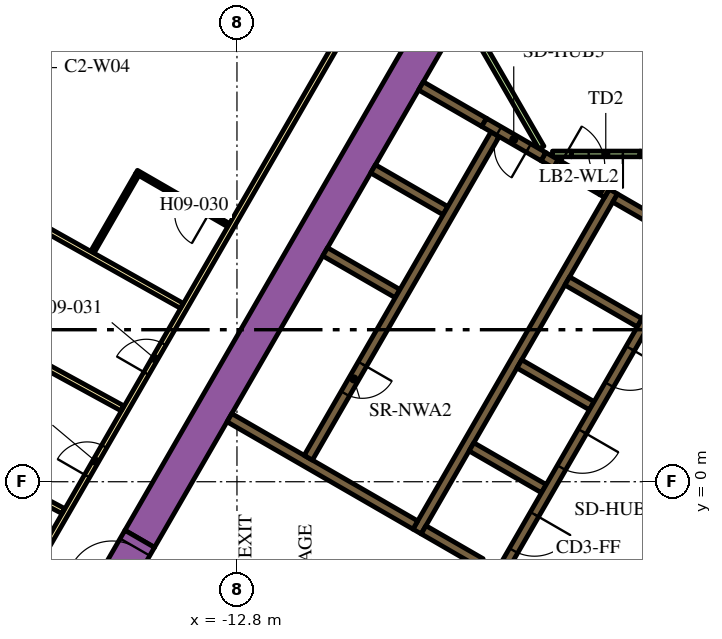
"""IFC4 building model, lengths in metres.
Left out: names, types, materials, properties, quantities, classifications, styles, units other than length and angle.
Written with IfcOpenShell. Run it as: python <this file> out.ifc"""

import sys

from ifc_helpers import new_model, si_unit, direction, frame, frame_2d, origin, place, context, subcontext, project, spatial, polyline, rectangle, outline, extrude, element, fill, save


model = new_model("IFC4")
c1 = context("Model", 3, precision=1e-05, world=origin(), true_north=direction((0.0, 1.0)))
c2 = subcontext(c1, "Body", "Model", "MODEL_VIEW")
j1 = project(units=[si_unit("LENGTHUNIT", "METRE"), si_unit("PLANEANGLEUNIT", "RADIAN")], contexts=[c1])
p1 = place(None, origin())
s1 = spatial("IfcSite", under=j1, at=p1, CompositionType="ELEMENT")
p2 = place(p1, origin())
s2 = spatial("IfcBuilding", under=s1, at=p2, CompositionType="ELEMENT")
p3 = place(p2, frame((0.0, 0.0, 118.8)))
s3 = spatial("IfcBuildingStorey", under=s2, at=p3, CompositionType="ELEMENT", Elevation=118.8)
p4 = place(p3, frame((-15.36, -1.503, 0.0), z_axis=(0.0, 0.0, 1.0), x_axis=(0.50000389221, 0.866023156604, 0.0)))
e1 = element("IfcWall", 1, at=p4, inside=s3, PredefinedType="SOLIDWALL", context=c2, shape_type="SweptSolid", body=[
    extrude(rectangle(XDim=21.0, YDim=0.9, at=frame_2d((10.5, 0.0))), origin(), (0.0, 0.0, 1.0), 3.9),
])
p5 = place(p3, frame((-8.06, -1.311, 0.0), z_axis=(0.0, 0.0, 1.0), x_axis=(0.50000273126, 0.866023826885, 0.0)))
e2 = element("IfcWall", 2, at=p5, inside=s3, PredefinedType="SOLIDWALL", context=c2, shape_type="SweptSolid", body=[
    extrude(rectangle(XDim=10.33, YDim=0.25, at=frame_2d((5.165, 0.0))), origin(), (0.0, 0.0, 1.0), 3.9),
])
p6 = place(p3, frame((-1.647, 6.771, 0.0), z_axis=(0.0, 0.0, 1.0), x_axis=(-0.865971728693, 0.500092956464, 0.0)))
e3 = element("IfcWall", 3, at=p6, inside=s3, PredefinedType="SOLIDWALL", context=c2, shape_type="SweptSolid", body=[
    extrude(rectangle(XDim=1.388, YDim=0.25, at=frame_2d((0.694, 0.0))), origin(), (0.0, 0.0, 1.0), 3.9),
])
for number, where, z_axis, x_axis in (
    (4, (-2.204, 4.182, 0.0), (0.0, 0.0, 1.0), (-0.866, 0.5, 0.0)),
    (5, (-5.369, 3.1, 0.0), (0.0, 0.0, 1.0), (0.866, -0.5, 0.0)),
    (6, (-4.724, -0.182, 0.0), (0.0, 0.0, 1.0), (-0.866, 0.5, 0.0)),
):
    element("IfcWall", number, at=place(p3, frame(where, z_axis=z_axis, x_axis=x_axis)), inside=s3, PredefinedType="SOLIDWALL", context=c2, shape_type="SweptSolid", body=[
        extrude(rectangle(XDim=2.2, YDim=0.25, at=frame_2d((1.1, 0.0))), origin(), (0.0, 0.0, 1.0), 3.9),
    ])
p7 = place(p3, frame((-7.889, -1.265, 0.0), z_axis=(0.0, 0.0, 1.0), x_axis=(0.865986741702, -0.500066958712, 0.0)))
e7 = element("IfcWall", 7, at=p7, inside=s3, PredefinedType="SOLIDWALL", context=c2, shape_type="SweptSolid", body=[
    extrude(rectangle(XDim=1.738, YDim=0.25, at=frame_2d((0.869, 0.0))), origin(), (0.0, 0.0, 1.0), 3.9),
])
p8 = place(p3, frame((-8.106, -1.14, 0.0), z_axis=(0.0, 0.0, 1.0), x_axis=(-0.866000643155, 0.500042884217, 0.0)))
e8 = element("IfcWall", 8, at=p8, inside=s3, PredefinedType="SOLIDWALL", context=c2, shape_type="SweptSolid", body=[
    extrude(rectangle(XDim=5.65, YDim=0.25, at=frame_2d((2.825, 0.0))), origin(), (0.0, 0.0, 1.0), 3.9),
])
p9 = place(p3, origin())
e9 = element("IfcWall", 9, at=p9, inside=s3, PredefinedType="SOLIDWALL", context=c2, shape_type="SweptSolid", body=[
    extrude(outline(polyline([(-3.128, 7.481), (-3.259, 7.557), (-3.134, 7.773), (-3.003, 7.698), (-3.128, 7.481)])), origin(), (0.0, 0.0, 1.0), 3.9),
])
for number, where, z_axis, x_axis in (
    (10, (-8.574, 4.95, 0.0), (0.0, 0.0, 1.0), (-0.866, 0.5, 0.0)),
    (11, (-7.314, 7.132, 0.0), (0.0, 0.0, 1.0), (-0.866, 0.5, 0.0)),
):
    element("IfcWall", number, at=place(p3, frame(where, z_axis=z_axis, x_axis=x_axis)), inside=s3, PredefinedType="SOLIDWALL", context=c2, shape_type="SweptSolid", body=[
        extrude(rectangle(XDim=2.2, YDim=0.25, at=frame_2d((1.1, 0.0))), origin(), (0.0, 0.0, 1.0), 3.9),
    ])
p10 = place(p3, frame((-6.296, 9.455, 0.0), z_axis=(0.0, 0.0, 1.0), x_axis=(-0.866011930837, 0.500023335103, 0.0)))
e12 = element("IfcWall", 12, at=p10, inside=s3, PredefinedType="SOLIDWALL", context=c2, shape_type="SweptSolid", body=[
    extrude(rectangle(XDim=1.92, YDim=0.25, at=frame_2d((0.96, 0.0))), origin(), (0.0, 0.0, 1.0), 3.9),
])
p11 = place(p3, frame((-4.409, 8.365, 0.0), z_axis=(0.0, 0.0, 1.0), x_axis=(-0.866057014183, 0.499945245186, 0.0)))
e13 = element("IfcWall", 13, at=p11, inside=s3, PredefinedType="SOLIDWALL", context=c2, shape_type="SweptSolid", body=[
    extrude(rectangle(XDim=0.379, YDim=0.25, at=frame_2d((0.19, 0.0))), origin(), (0.0, 0.0, 1.0), 3.9),
])
p12 = place(p3, frame((-2.195, 8.625, 0.0), z_axis=(0.0, 0.0, 1.0), x_axis=(1.0, 0.0, 0.0)))
e14 = element("IfcWall", 14, at=p12, inside=s3, PredefinedType="PARTITIONING", context=c2, shape_type="SweptSolid", body=[
    extrude(rectangle(XDim=1.145, YDim=0.15, at=frame_2d((0.573, 0.0))), origin(), (0.0, 0.0, 1.0), 2.75),
])
p13 = place(p3, frame((-6.823, 12.318, 0.0), z_axis=(0.0, 0.0, 1.0), x_axis=(0.500007885066, -0.866020851292, 0.0)))
e15 = element("IfcWall", 15, at=p13, inside=s3, PredefinedType="PARTITIONING", context=c2, shape_type="SweptSolid", body=[
    extrude(rectangle(XDim=4.072, YDim=0.15, at=frame_2d((2.036, 0.0))), origin(), (0.0, 0.0, 1.0), 2.75),
])
p14 = place(p3, frame((-4.498, 8.625, 0.0), z_axis=(0.0, 0.0, 1.0), x_axis=(1.0, 0.0, 0.0)))
e16 = element("IfcWall", 16, at=p14, inside=s3, PredefinedType="PARTITIONING", context=c2, shape_type="SweptSolid", body=[
    extrude(rectangle(XDim=0.502, YDim=0.15, at=frame_2d((0.251, 0.0))), origin(), (0.0, 0.0, 1.0), 2.75),
])
p15 = place(p3, frame((-6.008, 9.144, 0.0), z_axis=(0.0, 0.0, 1.0), x_axis=(-0.500006956611, -0.866021387346, 0.0)))
e17 = element("IfcWall", 17, at=p15, inside=s3, PredefinedType="SOLIDWALL", context=c2, shape_type="SweptSolid", body=[
    extrude(rectangle(XDim=9.83, YDim=0.25, at=frame_2d((4.915, 0.0))), origin(), (0.0, 0.0, 1.0), 3.9),
])
p16 = place(p15, frame((6.985, 0.0, 0.0)))
e18 = element("IfcOpeningElement", 18, at=p16, cuts=e17, PredefinedType="OPENING", context=c2, shape_type="SweptSolid", body=[
    extrude(rectangle(XDim=0.9, YDim=2.1, at=frame_2d((0.45, 1.05))), frame((0.0, 0.135, 0.0), z_axis=(0.0, -1.0, 0.0), x_axis=(1.0, 0.0, 0.0)), (0.0, 0.0, 1.0), 0.27),
])
p17 = place(p3, frame((-0.898, 6.194, 0.0), z_axis=(0.0, 0.0, 1.0), x_axis=(-0.499996202215, -0.866027596426, 0.0)))
e19 = element("IfcWall", 19, at=p17, inside=s3, PredefinedType="SOLIDWALL", context=c2, shape_type="SweptSolid", body=[
    extrude(rectangle(XDim=9.83, YDim=0.25, at=frame_2d((4.915, 0.0))), origin(), (0.0, 0.0, 1.0), 3.9),
])
p18 = place(p17, frame((0.585, 0.0, 0.0)))
e20 = element("IfcOpeningElement", 20, at=p18, cuts=e19, PredefinedType="OPENING", context=c2, shape_type="SweptSolid", body=[
    extrude(rectangle(XDim=1.1, YDim=2.1, at=frame_2d((0.55, 1.05))), frame((0.0, 0.135, 0.0), z_axis=(0.0, -1.0, 0.0), x_axis=(1.0, 0.0, 0.0)), (0.0, 0.0, 1.0), 0.27),
])
p19 = place(p17, frame((3.105, 0.0, 0.0)))
e21 = element("IfcOpeningElement", 21, at=p19, cuts=e19, PredefinedType="OPENING", context=c2, shape_type="SweptSolid", body=[
    extrude(rectangle(XDim=1.1, YDim=2.1, at=frame_2d((0.55, 1.05))), frame((0.0, 0.135, 0.0), z_axis=(0.0, -1.0, 0.0), x_axis=(1.0, 0.0, 0.0)), (0.0, 0.0, 1.0), 0.27),
])
p20 = place(p17, frame((5.625, 0.0, 0.0)))
e22 = element("IfcOpeningElement", 22, at=p20, cuts=e19, PredefinedType="OPENING", context=c2, shape_type="SweptSolid", body=[
    extrude(rectangle(XDim=1.1, YDim=2.1, at=frame_2d((0.55, 1.05))), frame((0.0, 0.135, 0.0), z_axis=(0.0, -1.0, 0.0), x_axis=(1.0, 0.0, 0.0)), (0.0, 0.0, 1.0), 0.27),
])
p21 = place(p17, frame((8.145, 0.0, 0.0)))
e23 = element("IfcOpeningElement", 23, at=p21, cuts=e19, PredefinedType="OPENING", context=c2, shape_type="SweptSolid", body=[
    extrude(rectangle(XDim=1.1, YDim=2.1, at=frame_2d((0.55, 1.05))), frame((0.0, 0.135, 0.0), z_axis=(0.0, -1.0, 0.0), x_axis=(1.0, 0.0, 0.0)), (0.0, 0.0, 1.0), 0.27),
])
p22 = place(p3, frame((-2.195, 8.625, 0.0), z_axis=(0.0, 0.0, 1.0), x_axis=(-1.0, 0.0, 0.0)))
e24 = element("IfcWall", 24, at=p22, inside=s3, PredefinedType="PARTITIONING", context=c2, shape_type="SweptSolid", body=[
    extrude(rectangle(XDim=1.8, YDim=0.15, at=frame_2d((0.9, 0.0))), origin(), (0.0, 0.0, 1.0), 2.75),
])
p23 = place(p22, frame((0.45, 0.0, 0.0)))
e25 = element("IfcOpeningElement", 25, at=p23, cuts=e24, PredefinedType="OPENING", context=c2, shape_type="SweptSolid", body=[
    extrude(rectangle(XDim=0.9, YDim=2.1, at=frame_2d((0.45, 1.05))), frame((0.0, 0.085, 0.0), z_axis=(0.0, -1.0, 0.0), x_axis=(1.0, 0.0, 0.0)), (0.0, 0.0, 1.0), 0.17),
])
p24 = place(p3, frame((-4.409, 8.365, 0.0), z_axis=(0.0, 0.0, 1.0), x_axis=(0.866034573852, -0.49998411664, 0.0)))
e26 = element("IfcWall", 26, at=p24, inside=s3, PredefinedType="SOLIDWALL", context=c2, shape_type="SweptSolid", body=[
    extrude(rectangle(XDim=1.4, YDim=0.25, at=frame_2d((0.7, 0.0))), origin(), (0.0, 0.0, 1.0), 3.9),
])
p25 = place(p24, frame((0.1, 0.0, 0.0)))
e27 = element("IfcOpeningElement", 27, at=p25, cuts=e26, PredefinedType="OPENING", context=c2, shape_type="SweptSolid", body=[
    extrude(rectangle(XDim=1.2, YDim=2.1, at=frame_2d((0.6, 1.05))), frame((0.0, 0.135, 0.0), z_axis=(0.0, -1.0, 0.0), x_axis=(1.0, 0.0, 0.0)), (0.0, 0.0, 1.0), 0.27),
])
p26 = place(p3, frame((-16.209, -2.976, 0.0), z_axis=(0.0, 0.0, 1.0), x_axis=(0.499954529098, 0.86605165483, 0.0)))
e28 = element("IfcWall", 28, at=p26, inside=s3, PredefinedType="SOLIDWALL", context=c2, shape_type="SweptSolid", body=[
    extrude(rectangle(XDim=1.7, YDim=0.9, at=frame_2d((0.85, 0.0))), origin(), (0.0, 0.0, 1.0), 3.9),
])
p27 = place(p26, frame((0.25, 0.0, 0.0)))
e29 = element("IfcOpeningElement", 29, at=p27, cuts=e28, PredefinedType="OPENING", context=c2, shape_type="SweptSolid", body=[
    extrude(rectangle(XDim=1.2, YDim=2.1, at=frame_2d((0.6, 1.05))), frame((0.0, 0.46, 0.0), z_axis=(0.0, -1.0, 0.0), x_axis=(1.0, 0.0, 0.0)), (0.0, 0.0, 1.0), 0.92),
])
p28 = place(p3, frame((-4.737, 8.555, 0.0), z_axis=(0.0, 0.0, 1.0), x_axis=(-0.865989075817, 0.500062916607, 0.0)))
e30 = element("IfcWall", 30, at=p28, inside=s3, PredefinedType="SOLIDWALL", context=c2, shape_type="SweptSolid", body=[
    extrude(rectangle(XDim=1.8, YDim=0.25, at=frame_2d((0.9, 0.0))), origin(), (0.0, 0.0, 1.0), 3.9),
])
p29 = place(p28, frame((0.45, 0.0, 0.0)))
e31 = element("IfcOpeningElement", 31, at=p29, cuts=e30, PredefinedType="OPENING", context=c2, shape_type="SweptSolid", body=[
    extrude(rectangle(XDim=0.9, YDim=2.1, at=frame_2d((0.45, 1.05))), frame((0.0, 0.135, 0.0), z_axis=(0.0, -1.0, 0.0), x_axis=(1.0, 0.0, 0.0)), (0.0, 0.0, 1.0), 0.27),
])
p30 = place(p3, frame((-19.081, -3.9, 0.0), z_axis=(0.0, 0.0, 1.0), x_axis=(0.499998313975, 0.866026377209, 0.0)))
e32 = element("IfcWall", 32, at=p30, inside=s3, PredefinedType="PARTITIONING", context=c2, shape_type="SweptSolid", body=[
    extrude(rectangle(XDim=25.766, YDim=0.15, at=frame_2d((12.883, 0.0))), origin(), (0.0, 0.0, 1.0), 2.75),
])
p31 = place(p30, frame((19.306, 0.0, 0.0)))
e33 = element("IfcOpeningElement", 33, at=p31, cuts=e32, PredefinedType="OPENING", context=c2, shape_type="SweptSolid", body=[
    extrude(rectangle(XDim=1.0, YDim=2.1, at=frame_2d((0.5, 1.05))), frame((0.0, 0.085, 0.0), z_axis=(0.0, -1.0, 0.0), x_axis=(1.0, 0.0, 0.0)), (0.0, 0.0, 1.0), 0.17),
])
p32 = place(p30, frame((18.0, 0.0, 0.0)))
e34 = element("IfcOpeningElement", 34, at=p32, cuts=e32, PredefinedType="OPENING", context=c2, shape_type="SweptSolid", body=[
    extrude(rectangle(XDim=1.0, YDim=2.1, at=frame_2d((0.5, 1.05))), frame((0.0, 0.085, 0.0), z_axis=(0.0, -1.0, 0.0), x_axis=(1.0, 0.0, 0.0)), (0.0, 0.0, 1.0), 0.17),
])
p33 = place(p30, frame((7.793, 0.0, 0.0)))
e35 = element("IfcOpeningElement", 35, at=p33, cuts=e32, PredefinedType="OPENING", context=c2, shape_type="SweptSolid", body=[
    extrude(rectangle(XDim=0.9, YDim=2.1, at=frame_2d((0.45, 1.05))), frame((0.0, 0.085, 0.0), z_axis=(0.0, -1.0, 0.0), x_axis=(1.0, 0.0, 0.0)), (0.0, 0.0, 1.0), 0.17),
])
p34 = place(p30, frame((4.674, 0.0, 0.0)))
e36 = element("IfcOpeningElement", 36, at=p34, cuts=e32, PredefinedType="OPENING", context=c2, shape_type="SweptSolid", body=[
    extrude(rectangle(XDim=0.9, YDim=2.1, at=frame_2d((0.45, 1.05))), frame((0.0, 0.085, 0.0), z_axis=(0.0, -1.0, 0.0), x_axis=(1.0, 0.0, 0.0)), (0.0, 0.0, 1.0), 0.17),
])
p35 = place(p30, frame((0.18, 0.0, 0.0)))
e37 = element("IfcOpeningElement", 37, at=p35, cuts=e32, PredefinedType="OPENING", context=c2, shape_type="SweptSolid", body=[
    extrude(rectangle(XDim=1.0, YDim=2.1, at=frame_2d((0.5, 1.05))), frame((0.0, 0.085, 0.0), z_axis=(0.0, -1.0, 0.0), x_axis=(1.0, 0.0, 0.0)), (0.0, 0.0, 1.0), 0.17),
])
p36 = place(p3, frame((-23.652, 2.567, 0.0), z_axis=(0.0, 0.0, 1.0), x_axis=(0.883019237957, -0.469336793144, 0.0)))
e38 = element("IfcWall", 38, at=p36, inside=s3, PredefinedType="PARTITIONING", context=c2, shape_type="SweptSolid", body=[
    extrude(rectangle(XDim=7.111, YDim=0.15, at=frame_2d((3.555, 0.0))), origin(), (0.0, 0.0, 1.0), 2.75),
])
p37 = place(p3, frame((-21.614, 5.102, 0.0), z_axis=(0.0, 0.0, 1.0), x_axis=(0.877484555087, -0.479604895287, 0.0)))
e39 = element("IfcWall", 39, at=p37, inside=s3, PredefinedType="PARTITIONING", context=c2, shape_type="SweptSolid", body=[
    extrude(rectangle(XDim=6.611, YDim=0.15, at=frame_2d((3.306, 0.0))), origin(), (0.0, 0.0, 1.0), 2.75),
])
p38 = place(p3, frame((-20.581, 8.185, 0.0), z_axis=(0.0, 0.0, 1.0), x_axis=(0.871820720803, -0.489825102233, 0.0)))
e40 = element("IfcWall", 40, at=p38, inside=s3, PredefinedType="PARTITIONING", context=c2, shape_type="SweptSolid", body=[
    extrude(rectangle(XDim=7.257, YDim=0.15, at=frame_2d((3.628, 0.0))), origin(), (0.0, 0.0, 1.0), 2.75),
])
p39 = place(p3, frame((-13.019, 6.751, 0.0), z_axis=(0.0, 0.0, 1.0), x_axis=(-0.866034573852, 0.49998411664, 0.0)))
e41 = element("IfcWall", 41, at=p39, inside=s3, PredefinedType="PARTITIONING", context=c2, shape_type="SweptSolid", body=[
    extrude(rectangle(XDim=2.8, YDim=0.1, at=frame_2d((1.4, 0.0))), origin(), (0.0, 0.0, 1.0), 2.75),
])
p40 = place(p39, frame((0.6, 0.0, 0.0)))
e42 = element("IfcOpeningElement", 42, at=p40, cuts=e41, PredefinedType="OPENING", context=c2, shape_type="SweptSolid", body=[
    extrude(rectangle(XDim=0.9, YDim=2.1, at=frame_2d((0.45, 1.05))), frame((0.0, 0.06, 0.0), z_axis=(0.0, -1.0, 0.0), x_axis=(1.0, 0.0, 0.0)), (0.0, 0.0, 1.0), 0.12),
])
p41 = place(p3, frame((-15.425, 8.083, 0.0), z_axis=(0.0, 0.0, 1.0), x_axis=(-0.500032858622, -0.866006432019, 0.0)))
e43 = element("IfcWall", 43, at=p41, inside=s3, PredefinedType="PARTITIONING", context=c2, shape_type="SweptSolid", body=[
    extrude(rectangle(XDim=2.36, YDim=0.1, at=frame_2d((1.18, 0.0))), origin(), (0.0, 0.0, 1.0), 2.75),
])
p42 = place(p16, origin())
e44 = element("IfcDoor", 44, at=p42, inside=s3, OperationType="SINGLE_SWING_LEFT", PredefinedType="DOOR", context=c2, shape_type="SweptSolid", body=[
    extrude(rectangle(XDim=0.9, YDim=2.1, at=frame_2d((0.45, 1.05))), frame((0.0, 0.025, 0.0), z_axis=(0.0, -1.0, 0.0), x_axis=(1.0, 0.0, 0.0)), (0.0, 0.0, 1.0), 0.05),
])
fill(e18, e44)
p43 = place(p19, origin())
e45 = element("IfcDoor", 45, at=p43, inside=s3, OperationType="DOUBLE_DOOR_SLIDING", PredefinedType="DOOR", context=c2, shape_type="SweptSolid", body=[
    extrude(rectangle(XDim=1.1, YDim=2.1, at=frame_2d((0.55, 1.05))), frame((0.0, 0.025, 0.0), z_axis=(0.0, -1.0, 0.0), x_axis=(1.0, 0.0, 0.0)), (0.0, 0.0, 1.0), 0.05),
])
fill(e21, e45)
p44 = place(p20, origin())
e46 = element("IfcDoor", 46, at=p44, inside=s3, OperationType="DOUBLE_DOOR_SLIDING", PredefinedType="DOOR", context=c2, shape_type="SweptSolid", body=[
    extrude(rectangle(XDim=1.1, YDim=2.1, at=frame_2d((0.55, 1.05))), frame((0.0, 0.025, 0.0), z_axis=(0.0, -1.0, 0.0), x_axis=(1.0, 0.0, 0.0)), (0.0, 0.0, 1.0), 0.05),
])
fill(e22, e46)
p45 = place(p21, origin())
e47 = element("IfcDoor", 47, at=p45, inside=s3, OperationType="DOUBLE_DOOR_SLIDING", PredefinedType="DOOR", context=c2, shape_type="SweptSolid", body=[
    extrude(rectangle(XDim=1.1, YDim=2.1, at=frame_2d((0.55, 1.05))), frame((0.0, 0.025, 0.0), z_axis=(0.0, -1.0, 0.0), x_axis=(1.0, 0.0, 0.0)), (0.0, 0.0, 1.0), 0.05),
])
fill(e23, e47)
p46 = place(p23, origin())
e48 = element("IfcDoor", 48, at=p46, inside=s3, OperationType="SINGLE_SWING_LEFT", PredefinedType="DOOR", context=c2, shape_type="SweptSolid", body=[
    extrude(rectangle(XDim=0.9, YDim=2.1, at=frame_2d((0.45, 1.05))), frame((0.0, 0.025, 0.0), z_axis=(0.0, -1.0, 0.0), x_axis=(1.0, 0.0, 0.0)), (0.0, 0.0, 1.0), 0.05),
])
fill(e25, e48)
p47 = place(p25, origin())
e49 = element("IfcDoor", 49, at=p47, inside=s3, OperationType="SINGLE_SWING_LEFT", PredefinedType="DOOR", context=c2, shape_type="SweptSolid", body=[
    extrude(rectangle(XDim=1.2, YDim=2.1, at=frame_2d((0.6, 1.05))), frame((0.0, 0.025, 0.0), z_axis=(0.0, -1.0, 0.0), x_axis=(1.0, 0.0, 0.0)), (0.0, 0.0, 1.0), 0.05),
])
fill(e27, e49)
p48 = place(p27, origin())
e50 = element("IfcDoor", 50, at=p48, inside=s3, OperationType="SINGLE_SWING_LEFT", PredefinedType="DOOR", context=c2, shape_type="SweptSolid", body=[
    extrude(rectangle(XDim=1.2, YDim=2.1, at=frame_2d((0.6, 1.05))), frame((0.0, 0.025, 0.0), z_axis=(0.0, -1.0, 0.0), x_axis=(1.0, 0.0, 0.0)), (0.0, 0.0, 1.0), 0.05),
])
fill(e29, e50)
p49 = place(p29, origin())
e51 = element("IfcDoor", 51, at=p49, inside=s3, OperationType="SINGLE_SWING_LEFT", PredefinedType="DOOR", context=c2, shape_type="SweptSolid", body=[
    extrude(rectangle(XDim=0.9, YDim=2.1, at=frame_2d((0.45, 1.05))), frame((0.0, 0.025, 0.0), z_axis=(0.0, -1.0, 0.0), x_axis=(1.0, 0.0, 0.0)), (0.0, 0.0, 1.0), 0.05),
])
fill(e31, e51)
p50 = place(p40, origin())
e52 = element("IfcDoor", 52, at=p50, inside=s3, OperationType="SINGLE_SWING_RIGHT", PredefinedType="DOOR", context=c2, shape_type="SweptSolid", body=[
    extrude(rectangle(XDim=0.9, YDim=2.1, at=frame_2d((0.45, 1.05))), frame((0.0, 0.025, 0.0), z_axis=(0.0, -1.0, 0.0), x_axis=(1.0, 0.0, 0.0)), (0.0, 0.0, 1.0), 0.05),
])
fill(e42, e52)
p51 = place(p33, origin())
e53 = element("IfcDoor", 53, at=p51, inside=s3, OperationType="SINGLE_SWING_RIGHT", PredefinedType="DOOR", context=c2, shape_type="SweptSolid", body=[
    extrude(rectangle(XDim=0.9, YDim=2.1, at=frame_2d((0.45, 1.05))), frame((0.0, 0.025, 0.0), z_axis=(0.0, -1.0, 0.0), x_axis=(1.0, 0.0, 0.0)), (0.0, 0.0, 1.0), 0.05),
])
fill(e35, e53)
p52 = place(p34, origin())
e54 = element("IfcDoor", 54, at=p52, inside=s3, OperationType="SINGLE_SWING_LEFT", PredefinedType="DOOR", context=c2, shape_type="SweptSolid", body=[
    extrude(rectangle(XDim=0.9, YDim=2.1, at=frame_2d((0.45, 1.05))), frame((0.0, 0.025, 0.0), z_axis=(0.0, -1.0, 0.0), x_axis=(1.0, 0.0, 0.0)), (0.0, 0.0, 1.0), 0.05),
])
fill(e36, e54)
save(model, sys.argv[1])
